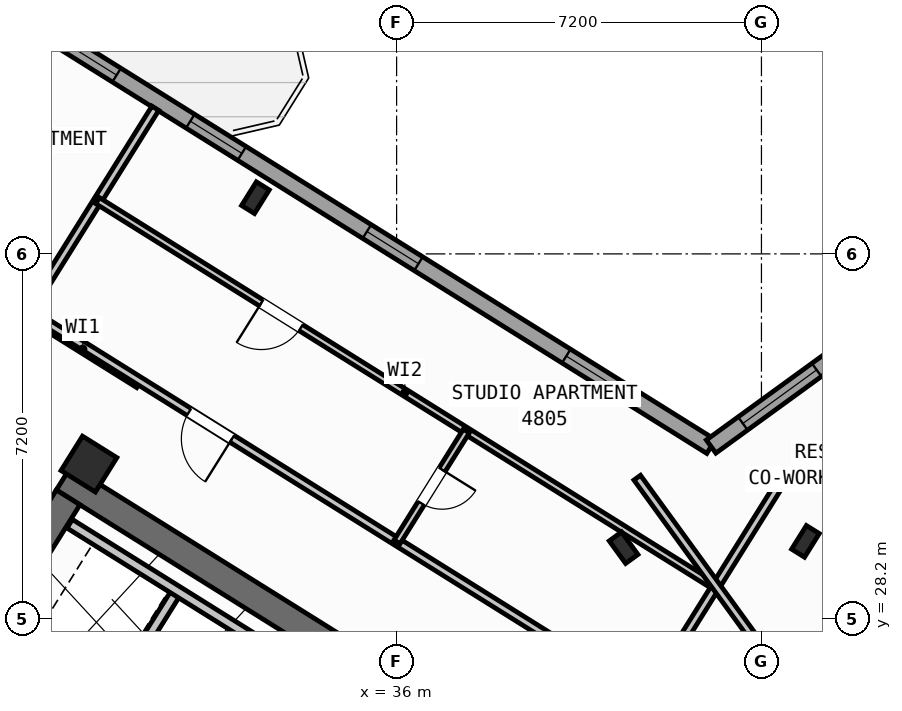
"""IFC4 building model, lengths in metres.
Left out: names, types, materials, properties, quantities, classifications, styles, units other than length and angle.
Written with IfcOpenShell. Run it as: python <this file> out.ifc"""

import sys

from ifc_helpers import new_model, si_unit, direction, frame, frame_2d, origin, origin_2d, place, context, subcontext, project, spatial, rectangle, hollow_rectangle, i_section, extrude, source, transform, mapped, element, fill, save


model = new_model("IFC4")
c1 = context("Model", 3, precision=1e-05, world=origin(), true_north=direction((0.0, 1.0)))
c2 = subcontext(c1, "Body", "Model", "MODEL_VIEW")
j1 = project(units=[si_unit("LENGTHUNIT", "METRE"), si_unit("PLANEANGLEUNIT", "RADIAN")], contexts=[c1])
p1 = place(None, origin())
s1 = spatial("IfcSite", under=j1, at=p1, CompositionType="ELEMENT")
p2 = place(p1, origin())
s2 = spatial("IfcBuilding", under=s1, at=p2, CompositionType="ELEMENT")
p3 = place(p2, frame((0.0, 0.0, 191.4)))
s3 = spatial("IfcBuildingStorey", under=s2, at=p3, CompositionType="ELEMENT", Elevation=191.4)
p4 = place(p3, frame((40.573, 24.01, 0.0), z_axis=(0.0, 0.0, 1.0), x_axis=(-0.848047359947, 0.529920442413, 0.0)))
e1 = element("IfcWall", 1, at=p4, inside=s3, PredefinedType="SHEAR", context=c2, shape_type="SweptSolid", body=[
    extrude(rectangle(XDim=13.14, YDim=0.55, at=frame_2d((6.57, 0.0))), origin(), (0.0, 0.0, 1.0), 3.32),
])
p5 = place(p3, frame((29.517, 30.594, 0.0), z_axis=(0.0, 0.0, 1.0), x_axis=(-0.529906864564, -0.848055844204, 0.0)))
e2 = element("IfcWall", 2, at=p5, inside=s3, PredefinedType="SHEAR", context=c2, shape_type="SweptSolid", body=[
    extrude(rectangle(XDim=3.575, YDim=0.55, at=frame_2d((1.788, 0.0))), origin(), (0.0, 0.0, 1.0), 3.32),
])
p6 = place(p3, frame((44.365, 24.142, 0.0), z_axis=(0.0, 0.0, 1.0), x_axis=(0.809024304885, 0.587775190107, 0.0)))
e3 = element("IfcWall", 3, at=p6, inside=s3, PredefinedType="SHEAR", context=c2, shape_type="SweptSolid", body=[
    extrude(rectangle(XDim=12.34, YDim=0.55, at=frame_2d((6.17, 0.0))), origin(), (0.0, 0.0, 1.0), 3.32),
])
m1 = source(origin(), c2, "Body", "SweptSolid", [
    extrude(i_section(OverallWidth=0.3, OverallDepth=0.55, WebThickness=0.015, FlangeThickness=0.029, at=origin_2d()), origin(), (0.0, 0.0, 1.0), 3.6),
])
for number, where, z_axis, x_axis in (
    (4, (44.068, 29.726, 0.0), (0.0, 0.0, 1.0), (-0.848, 0.53, 0.0)),
    (5, (33.213, 36.509, 0.0), (0.0, 0.0, 1.0), (-0.848, 0.53, 0.0)),
):
    element("IfcColumn", number, at=place(p3, frame(where, z_axis=z_axis, x_axis=x_axis)), inside=s3, PredefinedType="COLUMN", context=c2, shape_type="MappedRepresentation", body=[
        mapped(m1, transform((0.0, 0.0, 0.0), scale=1.0)),
    ])
m2 = source(origin(), c2, "Body", "SweptSolid", [
    extrude(hollow_rectangle(XDim=0.8, YDim=0.8, WallThickness=0.032, at=origin_2d()), origin(), (0.0, 0.0, 1.0), 3.6),
])
p7 = place(p3, frame((29.928, 31.251, 0.0), z_axis=(0.0, 0.0, 1.0), x_axis=(-0.848048096156, 0.529919264233, 0.0)))
e6 = element("IfcColumn", 6, at=p7, inside=s3, PredefinedType="COLUMN", context=c2, shape_type="MappedRepresentation", body=[
    mapped(m2, transform((0.0, 0.0, 0.0), scale=1.0)),
])
p8 = place(p3, frame((40.479, 29.601, 0.0), z_axis=(0.0, 0.0, 1.0), x_axis=(0.809016994375, 0.587785252292, 0.0)))
e7 = element("IfcColumn", 7, at=p8, inside=s3, PredefinedType="COLUMN", context=c2, shape_type="MappedRepresentation", body=[
    mapped(m1, transform((0.0, 0.0, 0.0), scale=1.0)),
])
p9 = place(p3, frame((31.76, 12.183, 0.0), z_axis=(0.0, 0.0, 1.0), x_axis=(-0.848047074256, 0.529920899612, 0.0)))
e8 = element("IfcWall", 8, at=p9, inside=s3, PredefinedType="STANDARD", context=c2, shape_type="SweptSolid", body=[
    extrude(rectangle(XDim=30.652, YDim=0.32, at=frame_2d((15.326, 0.0))), origin(), (0.0, 0.0, 1.0), 3.32),
])
p10 = place(p9, frame((15.166, 0.0, 0.0)))
e9 = element("IfcOpeningElement", 9, at=p10, cuts=e8, PredefinedType="OPENING", context=c2, shape_type="SweptSolid", body=[
    extrude(rectangle(XDim=1.2, YDim=2.15, at=frame_2d((0.6, 1.075))), frame((0.0, 0.17, 0.0), z_axis=(0.0, -1.0, 0.0), x_axis=(1.0, 0.0, 0.0)), (0.0, 0.0, 1.0), 0.34),
])
p11 = place(p9, frame((2.015, 0.0, 0.8)))
e10 = element("IfcOpeningElement", 10, at=p11, cuts=e8, PredefinedType="OPENING", context=c2, shape_type="SweptSolid", body=[
    extrude(rectangle(XDim=2.1, YDim=1.55, at=frame_2d((1.05, 0.775))), frame((0.0, 0.17, 0.0), z_axis=(0.0, -1.0, 0.0), x_axis=(1.0, 0.0, 0.0)), (0.0, 0.0, 1.0), 0.34),
])
p12 = place(p9, frame((7.244, 0.0, 0.8)))
e11 = element("IfcOpeningElement", 11, at=p12, cuts=e8, PredefinedType="OPENING", context=c2, shape_type="SweptSolid", body=[
    extrude(rectangle(XDim=2.1, YDim=1.55, at=frame_2d((1.05, 0.775))), frame((0.0, 0.17, 0.0), z_axis=(0.0, -1.0, 0.0), x_axis=(1.0, 0.0, 0.0)), (0.0, 0.0, 1.0), 0.34),
])
p13 = place(p9, frame((12.623, 0.0, 1.0)))
e12 = element("IfcOpeningElement", 12, at=p13, cuts=e8, PredefinedType="OPENING", context=c2, shape_type="SweptSolid", body=[
    extrude(rectangle(XDim=0.9, YDim=1.25, at=frame_2d((0.45, 0.625))), frame((0.0, 0.17, 0.0), z_axis=(0.0, -1.0, 0.0), x_axis=(1.0, 0.0, 0.0)), (0.0, 0.0, 1.0), 0.34),
])
p14 = place(p9, frame((19.565, 0.0, 0.95)))
e13 = element("IfcOpeningElement", 13, at=p14, cuts=e8, PredefinedType="OPENING", context=c2, shape_type="SweptSolid", body=[
    extrude(rectangle(XDim=1.2, YDim=1.4, at=frame_2d((0.6, 0.7))), frame((0.0, 0.17, 0.0), z_axis=(0.0, -1.0, 0.0), x_axis=(1.0, 0.0, 0.0)), (0.0, 0.0, 1.0), 0.34),
])
p15 = place(p9, frame((25.983, 0.0, 1.0)))
e14 = element("IfcOpeningElement", 14, at=p15, cuts=e8, PredefinedType="OPENING", context=c2, shape_type="SweptSolid", body=[
    extrude(rectangle(XDim=0.9, YDim=1.25, at=frame_2d((0.45, 0.625))), frame((0.0, 0.17, 0.0), z_axis=(0.0, -1.0, 0.0), x_axis=(1.0, 0.0, 0.0)), (0.0, 0.0, 1.0), 0.34),
])
p16 = place(p9, frame((28.433, 0.0, 1.0)))
e15 = element("IfcOpeningElement", 15, at=p16, cuts=e8, PredefinedType="OPENING", context=c2, shape_type="SweptSolid", body=[
    extrude(rectangle(XDim=0.9, YDim=1.25, at=frame_2d((0.45, 0.625))), frame((0.0, 0.17, 0.0), z_axis=(0.0, -1.0, 0.0), x_axis=(1.0, 0.0, 0.0)), (0.0, 0.0, 1.0), 0.34),
])
p17 = place(p3, frame((17.424, 47.083, 0.0), z_axis=(0.0, 0.0, 1.0), x_axis=(0.848049927979, -0.529916332693, 0.0)))
e16 = element("IfcWall", 16, at=p17, inside=s3, PredefinedType="STANDARD", context=c2, shape_type="SweptSolid", body=[
    extrude(rectangle(XDim=29.223, YDim=0.32, at=frame_2d((14.612, 0.0))), origin(), (0.0, 0.0, 1.0), 3.32),
])
p18 = place(p17, frame((3.764, 0.0, 0.0)))
e17 = element("IfcOpeningElement", 17, at=p18, cuts=e16, PredefinedType="OPENING", context=c2, shape_type="SweptSolid", body=[
    extrude(rectangle(XDim=1.05, YDim=2.15, at=frame_2d((0.525, 1.075))), frame((0.0, 0.17, 0.0), z_axis=(0.0, -1.0, 0.0), x_axis=(1.0, 0.0, 0.0)), (0.0, 0.0, 1.0), 0.34),
])
p19 = place(p17, frame((8.344, 0.0, 0.8)))
e18 = element("IfcOpeningElement", 18, at=p19, cuts=e16, PredefinedType="OPENING", context=c2, shape_type="SweptSolid", body=[
    extrude(rectangle(XDim=2.1, YDim=1.55, at=frame_2d((1.05, 0.775))), frame((0.0, 0.17, 0.0), z_axis=(0.0, -1.0, 0.0), x_axis=(1.0, 0.0, 0.0)), (0.0, 0.0, 1.0), 0.34),
])
p20 = place(p17, frame((13.589, 0.0, 0.85)))
e19 = element("IfcOpeningElement", 19, at=p20, cuts=e16, PredefinedType="OPENING", context=c2, shape_type="SweptSolid", body=[
    extrude(rectangle(XDim=1.8, YDim=1.5, at=frame_2d((0.9, 0.75))), frame((0.0, 0.17, 0.0), z_axis=(0.0, -1.0, 0.0), x_axis=(1.0, 0.0, 0.0)), (0.0, 0.0, 1.0), 0.34),
])
p21 = place(p17, frame((17.104, 0.0, 0.95)))
e20 = element("IfcOpeningElement", 20, at=p21, cuts=e16, PredefinedType="OPENING", context=c2, shape_type="SweptSolid", body=[
    extrude(rectangle(XDim=1.2, YDim=1.4, at=frame_2d((0.6, 0.7))), frame((0.0, 0.17, 0.0), z_axis=(0.0, -1.0, 0.0), x_axis=(1.0, 0.0, 0.0)), (0.0, 0.0, 1.0), 0.34),
])
p22 = place(p17, frame((21.214, 0.0, 0.95)))
e21 = element("IfcOpeningElement", 21, at=p22, cuts=e16, PredefinedType="OPENING", context=c2, shape_type="SweptSolid", body=[
    extrude(rectangle(XDim=1.2, YDim=1.4, at=frame_2d((0.6, 0.7))), frame((0.0, 0.17, 0.0), z_axis=(0.0, -1.0, 0.0), x_axis=(1.0, 0.0, 0.0)), (0.0, 0.0, 1.0), 0.34),
])
p23 = place(p17, frame((25.853, 0.0, 0.95)))
e22 = element("IfcOpeningElement", 22, at=p23, cuts=e16, PredefinedType="OPENING", context=c2, shape_type="SweptSolid", body=[
    extrude(rectangle(XDim=1.2, YDim=1.4, at=frame_2d((0.6, 0.7))), frame((0.0, 0.17, 0.0), z_axis=(0.0, -1.0, 0.0), x_axis=(1.0, 0.0, 0.0)), (0.0, 0.0, 1.0), 0.34),
])
p24 = place(p3, frame((42.207, 31.597, 0.0), z_axis=(0.0, 0.0, 1.0), x_axis=(0.809020333377, 0.587780656523, 0.0)))
e23 = element("IfcWall", 23, at=p24, inside=s3, PredefinedType="STANDARD", context=c2, shape_type="SweptSolid", body=[
    extrude(rectangle(XDim=15.223, YDim=0.32, at=frame_2d((7.611, 0.0))), origin(), (0.0, 0.0, 1.0), 3.32),
])
p25 = place(p24, frame((12.82, 0.0, 0.0)))
e24 = element("IfcOpeningElement", 24, at=p25, cuts=e23, PredefinedType="OPENING", context=c2, shape_type="SweptSolid", body=[
    extrude(rectangle(XDim=1.05, YDim=2.15, at=frame_2d((0.525, 1.075))), frame((0.0, 0.17, 0.0), z_axis=(0.0, -1.0, 0.0), x_axis=(1.0, 0.0, 0.0)), (0.0, 0.0, 1.0), 0.34),
])
p26 = place(p24, frame((0.775, 0.0, 0.85)))
e25 = element("IfcOpeningElement", 25, at=p26, cuts=e23, PredefinedType="OPENING", context=c2, shape_type="SweptSolid", body=[
    extrude(rectangle(XDim=1.8, YDim=1.5, at=frame_2d((0.9, 0.75))), frame((0.0, 0.17, 0.0), z_axis=(0.0, -1.0, 0.0), x_axis=(1.0, 0.0, 0.0)), (0.0, 0.0, 1.0), 0.34),
])
p27 = place(p24, frame((5.544, 0.0, 0.85)))
e26 = element("IfcOpeningElement", 26, at=p27, cuts=e23, PredefinedType="OPENING", context=c2, shape_type="SweptSolid", body=[
    extrude(rectangle(XDim=1.8, YDim=1.5, at=frame_2d((0.9, 0.75))), frame((0.0, 0.17, 0.0), z_axis=(0.0, -1.0, 0.0), x_axis=(1.0, 0.0, 0.0)), (0.0, 0.0, 1.0), 0.34),
])
p28 = place(p24, frame((10.219, 0.0, 1.0)))
e27 = element("IfcOpeningElement", 27, at=p28, cuts=e23, PredefinedType="OPENING", context=c2, shape_type="SweptSolid", body=[
    extrude(rectangle(XDim=0.9, YDim=1.25, at=frame_2d((0.45, 0.625))), frame((0.0, 0.17, 0.0), z_axis=(0.0, -1.0, 0.0), x_axis=(1.0, 0.0, 0.0)), (0.0, 0.0, 1.0), 0.34),
])
p29 = place(p3, frame((31.645, 28.716, 0.0), z_axis=(0.0, 0.0, 1.0), x_axis=(-0.52986693015, -0.848080795876, 0.0)))
e28 = element("IfcWall", 28, at=p29, inside=s3, PredefinedType="STANDARD", context=c2, shape_type="SweptSolid", body=[
    extrude(rectangle(XDim=2.66, YDim=0.2, at=frame_2d((1.33, 0.0))), origin(), (0.0, 0.0, 1.0), 3.31),
])
p30 = place(p3, frame((33.363, 27.69, 0.0), z_axis=(0.0, 0.0, 1.0), x_axis=(-0.848047090064, 0.529920874315, 0.0)))
e29 = element("IfcWall", 29, at=p30, inside=s3, PredefinedType="STANDARD", context=c2, shape_type="SweptSolid", body=[
    extrude(rectangle(XDim=4.498, YDim=0.2, at=frame_2d((2.249, 0.0))), origin(), (0.0, 0.0, 1.0), 3.31),
])
p31 = place(p3, frame((30.914, 32.829, 0.0), z_axis=(0.0, 0.0, 1.0), x_axis=(-0.848008813643, 0.529982124211, 0.0)))
e30 = element("IfcWall", 30, at=p31, inside=s3, PredefinedType="PARTITIONING", context=c2, shape_type="SweptSolid", body=[
    extrude(rectangle(XDim=2.61, YDim=0.16, at=frame_2d((1.305, 0.0))), origin(), (0.0, 0.0, 1.0), 3.31),
])
p32 = place(p3, frame((31.239, 38.274, 0.0), z_axis=(0.0, 0.0, 1.0), x_axis=(-0.529914125013, -0.848051307476, 0.0)))
e31 = element("IfcWall", 31, at=p32, inside=s3, PredefinedType="PARTITIONING", context=c2, shape_type="SweptSolid", body=[
    extrude(rectangle(XDim=10.35, YDim=0.16, at=frame_2d((5.175, 0.0))), origin(), (0.0, 0.0, 1.0), 3.31),
])
p33 = place(p3, frame((41.936, 26.012, 0.0), z_axis=(0.0, 0.0, 1.0), x_axis=(-0.848051154596, 0.529914369676, 0.0)))
e32 = element("IfcWall", 32, at=p33, inside=s3, PredefinedType="PARTITIONING", context=c2, shape_type="SweptSolid", body=[
    extrude(rectangle(XDim=15.57, YDim=0.16, at=frame_2d((7.785, 0.0))), origin(), (0.0, 0.0, 1.0), 3.31),
])
p34 = place(p33, frame((10.83, 0.0, 0.0)))
e33 = element("IfcOpeningElement", 33, at=p34, cuts=e32, PredefinedType="OPENING", context=c2, shape_type="SweptSolid", body=[
    extrude(rectangle(XDim=1.0, YDim=2.1, at=frame_2d((0.5, 1.05))), frame((0.0, 0.09, 0.0), z_axis=(0.0, -1.0, 0.0), x_axis=(1.0, 0.0, 0.0)), (0.0, 0.0, 1.0), 0.18),
])
p35 = place(p3, frame((43.704, 31.086, 0.0), z_axis=(0.0, 0.0, 1.0), x_axis=(-0.529906828443, -0.848055866774, 0.0)))
e34 = element("IfcWall", 34, at=p35, inside=s3, PredefinedType="PARTITIONING", context=c2, shape_type="SweptSolid", body=[
    extrude(rectangle(XDim=5.48, YDim=0.16, at=frame_2d((2.74, 0.0))), origin(), (0.0, 0.0, 1.0), 3.31),
])
p36 = place(p3, frame((42.226, 28.873, 0.0), z_axis=(0.0, 0.0, 1.0), x_axis=(-0.848049134363, 0.529917602752, 0.0)))
e35 = element("IfcWall", 35, at=p36, inside=s3, PredefinedType="PLUMBINGWALL", context=c2, shape_type="SweptSolid", body=[
    extrude(rectangle(XDim=14.3, YDim=0.14, at=frame_2d((7.15, 0.0))), origin(), (0.0, 0.0, 1.0), 3.31),
])
p37 = place(p36, frame((9.57, 0.0, 0.0)))
e36 = element("IfcOpeningElement", 36, at=p37, cuts=e35, PredefinedType="OPENING", context=c2, shape_type="SweptSolid", body=[
    extrude(rectangle(XDim=0.92, YDim=2.08, at=frame_2d((0.46, 1.04))), frame((0.0, 0.08, 0.0), z_axis=(0.0, -1.0, 0.0), x_axis=(1.0, 0.0, 0.0)), (0.0, 0.0, 1.0), 0.16),
])
p38 = place(p3, frame((37.375, 31.904, 0.0), z_axis=(0.0, 0.0, 1.0), x_axis=(-0.529913878929, -0.848051461244, 0.0)))
e37 = element("IfcWall", 37, at=p38, inside=s3, PredefinedType="PLUMBINGWALL", context=c2, shape_type="SweptSolid", body=[
    extrude(rectangle(XDim=2.58, YDim=0.14, at=frame_2d((1.29, 0.0))), origin(), (0.0, 0.0, 1.0), 3.31),
])
p39 = place(p38, frame((0.9, 0.0, 0.0)))
e38 = element("IfcOpeningElement", 38, at=p39, cuts=e37, PredefinedType="OPENING", context=c2, shape_type="SweptSolid", body=[
    extrude(rectangle(XDim=0.78, YDim=2.05, at=frame_2d((0.39, 1.025))), frame((0.0, 0.08, 0.0), z_axis=(0.0, -1.0, 0.0), x_axis=(1.0, 0.0, 0.0)), (0.0, 0.0, 1.0), 0.16),
])
p40 = place(p3, frame((42.866, 26.044, 0.0), z_axis=(0.0, 0.0, 1.0), x_axis=(0.809020254154, 0.587780765566, 0.0)))
e39 = element("IfcWall", 39, at=p40, inside=s3, PredefinedType="PARTITIONING", context=c2, shape_type="SweptSolid", body=[
    extrude(rectangle(XDim=14.67, YDim=0.16, at=frame_2d((7.335, 0.0))), origin(), (0.0, 0.0, 1.0), 3.31),
])
p41 = place(p40, frame((3.215, 0.0, 0.0)))
e40 = element("IfcOpeningElement", 40, at=p41, cuts=e39, PredefinedType="OPENING", context=c2, shape_type="SweptSolid", body=[
    extrude(rectangle(XDim=1.0, YDim=2.1, at=frame_2d((0.5, 1.05))), frame((0.0, 0.09, 0.0), z_axis=(0.0, -1.0, 0.0), x_axis=(1.0, 0.0, 0.0)), (0.0, 0.0, 1.0), 0.18),
])
p42 = place(p40, frame((9.915, 0.0, 0.0)))
e41 = element("IfcOpeningElement", 41, at=p42, cuts=e39, PredefinedType="OPENING", context=c2, shape_type="SweptSolid", body=[
    extrude(rectangle(XDim=1.0, YDim=2.1, at=frame_2d((0.5, 1.05))), frame((0.0, 0.09, 0.0), z_axis=(0.0, -1.0, 0.0), x_axis=(1.0, 0.0, 0.0)), (0.0, 0.0, 1.0), 0.18),
])
p43 = place(p3, frame((43.969, 26.55, 0.0), z_axis=(0.0, 0.0, 1.0), x_axis=(-0.587776919386, 0.80902304852, 0.0)))
e42 = element("IfcWall", 42, at=p43, inside=s3, PredefinedType="PARTITIONING", context=c2, shape_type="SweptSolid", body=[
    extrude(rectangle(XDim=5.48, YDim=0.16, at=frame_2d((2.74, 0.0))), origin(), (0.0, 0.0, 1.0), 3.31),
])
m3 = source(origin(), c2, "Body", "SweptSolid", [
    extrude(rectangle(XDim=1.8, YDim=1.5, at=frame_2d((0.9, 0.75))), frame((0.0, 0.03, 0.0), z_axis=(0.0, -1.0, 0.0), x_axis=(1.0, 0.0, 0.0)), (0.0, 0.0, 1.0), 0.06),
])
p44 = place(p20, origin())
e43 = element("IfcWindow", 43, at=p44, inside=s3, PartitioningType="SINGLE_PANEL", PredefinedType="WINDOW", context=c2, shape_type="MappedRepresentation", body=[
    mapped(m3, transform((0.0, 0.0, 0.0), scale=1.0)),
])
fill(e19, e43)
m4 = source(origin(), c2, "Body", "SweptSolid", [
    extrude(rectangle(XDim=1.2, YDim=1.4, at=frame_2d((0.6, 0.7))), frame((0.0, 0.03, 0.0), z_axis=(0.0, -1.0, 0.0), x_axis=(1.0, 0.0, 0.0)), (0.0, 0.0, 1.0), 0.06),
])
p45 = place(p21, origin())
e44 = element("IfcWindow", 44, at=p45, inside=s3, PartitioningType="SINGLE_PANEL", PredefinedType="WINDOW", context=c2, shape_type="MappedRepresentation", body=[
    mapped(m4, transform((0.0, 0.0, 0.0), scale=1.0)),
])
fill(e20, e44)
p46 = place(p22, origin())
e45 = element("IfcWindow", 45, at=p46, inside=s3, PartitioningType="SINGLE_PANEL", PredefinedType="WINDOW", context=c2, shape_type="MappedRepresentation", body=[
    mapped(m4, transform((0.0, 0.0, 0.0), scale=1.0)),
])
fill(e21, e45)
p47 = place(p23, origin())
e46 = element("IfcWindow", 46, at=p47, inside=s3, PartitioningType="SINGLE_PANEL", PredefinedType="WINDOW", context=c2, shape_type="MappedRepresentation", body=[
    mapped(m4, transform((0.0, 0.0, 0.0), scale=1.0)),
])
fill(e22, e46)
p48 = place(p26, origin())
e47 = element("IfcWindow", 47, at=p48, inside=s3, PartitioningType="SINGLE_PANEL", PredefinedType="WINDOW", context=c2, shape_type="MappedRepresentation", body=[
    mapped(m3, transform((0.0, 0.0, 0.0), scale=1.0)),
])
fill(e25, e47)
m5 = source(origin(), c2, "Body", "SweptSolid", [
    extrude(rectangle(XDim=1.0, YDim=2.1, at=frame_2d((0.5, 1.05))), frame((0.0, 0.025, 0.0), z_axis=(0.0, -1.0, 0.0), x_axis=(1.0, 0.0, 0.0)), (0.0, 0.0, 1.0), 0.05),
])
p49 = place(p34, origin())
e48 = element("IfcDoor", 48, at=p49, inside=s3, OperationType="SINGLE_SWING_LEFT", PredefinedType="DOOR", context=c2, shape_type="MappedRepresentation", body=[
    mapped(m5, transform((0.0, 0.0, 0.0), scale=1.0)),
])
fill(e33, e48)
m6 = source(origin(), c2, "Body", "SweptSolid", [
    extrude(rectangle(XDim=0.92, YDim=2.08, at=frame_2d((0.46, 1.04))), frame((0.0, 0.025, 0.0), z_axis=(0.0, -1.0, 0.0), x_axis=(1.0, 0.0, 0.0)), (0.0, 0.0, 1.0), 0.05),
])
p50 = place(p37, origin())
e49 = element("IfcDoor", 49, at=p50, inside=s3, OperationType="SINGLE_SWING_RIGHT", PredefinedType="DOOR", context=c2, shape_type="MappedRepresentation", body=[
    mapped(m6, transform((0.0, 0.0, 0.0), scale=1.0)),
])
fill(e36, e49)
m7 = source(origin(), c2, "Body", "SweptSolid", [
    extrude(rectangle(XDim=0.78, YDim=2.05, at=frame_2d((0.39, 1.025))), frame((0.0, 0.025, 0.0), z_axis=(0.0, -1.0, 0.0), x_axis=(1.0, 0.0, 0.0)), (0.0, 0.0, 1.0), 0.05),
])
p51 = place(p39, origin())
e50 = element("IfcDoor", 50, at=p51, inside=s3, OperationType="SINGLE_SWING_LEFT", PredefinedType="DOOR", context=c2, shape_type="MappedRepresentation", body=[
    mapped(m7, transform((0.0, 0.0, 0.0), scale=1.0)),
])
fill(e38, e50)
save(model, sys.argv[1])
